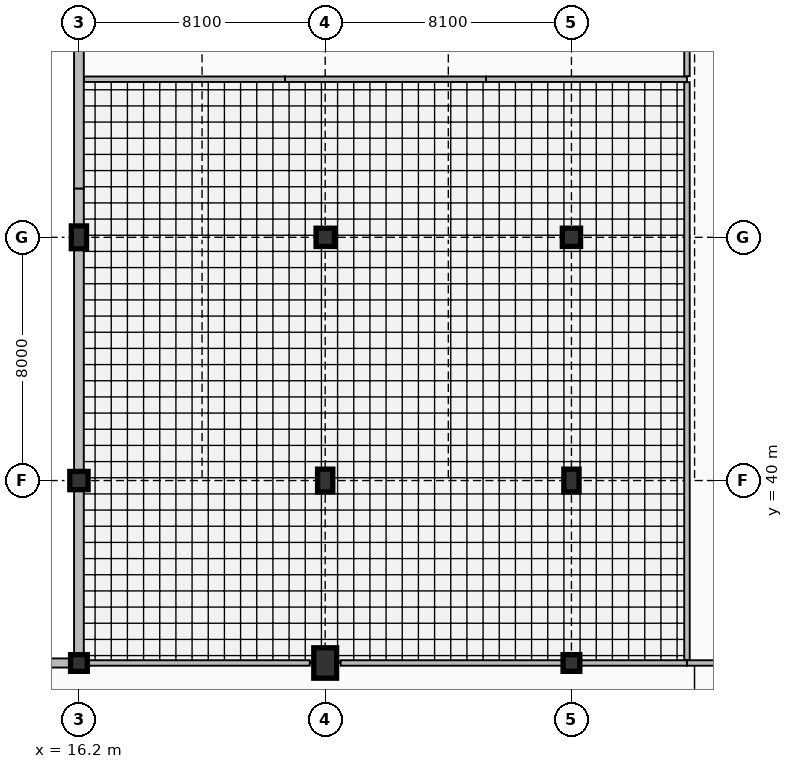
"""IFC4 building model, lengths in metres.
Left out: names, types, materials, properties, quantities, classifications, styles, units other than length and angle.
Written with IfcOpenShell. Run it as: python <this file> out.ifc"""

import sys

from ifc_helpers import new_model, si_unit, direction, frame, frame_2d, origin, origin_2d, place, context, subcontext, project, spatial, rectangle, extrude, element, fill, save


model = new_model("IFC4")
c1 = context("Model", 3, precision=1e-05, world=origin(), true_north=direction((0.0, 1.0)))
c2 = subcontext(c1, "Body", "Model", "MODEL_VIEW")
j1 = project(units=[si_unit("LENGTHUNIT", "METRE"), si_unit("PLANEANGLEUNIT", "RADIAN")], contexts=[c1])
p1 = place(None, origin())
s1 = spatial("IfcSite", under=j1, at=p1, CompositionType="ELEMENT")
p2 = place(p1, origin())
s2 = spatial("IfcBuilding", under=s1, at=p2, CompositionType="ELEMENT")
p3 = place(p2, frame((0.0, 0.0, 10.2)))
s3 = spatial("IfcBuildingStorey", under=s2, at=p3, CompositionType="ELEMENT", Elevation=10.2)
p4 = place(p3, frame((16.2, 34.0, 0.0), z_axis=(0.0, 0.0, 1.0), x_axis=(1.0, 0.0, 0.0)))
e1 = element("IfcColumn", 1, at=p4, inside=s3, PredefinedType="COLUMN", context=c2, shape_type="SweptSolid", body=[
    extrude(rectangle(XDim=0.55, YDim=0.55, at=origin_2d()), origin(), (0.0, 0.0, 1.0), 4.24),
])
p5 = place(p3, frame((16.2, 40.0, 0.0), z_axis=(0.0, 0.0, 1.0), x_axis=(1.0, 0.0, 0.0)))
e2 = element("IfcColumn", 2, at=p5, inside=s3, PredefinedType="COLUMN", context=c2, shape_type="SweptSolid", body=[
    extrude(rectangle(XDim=0.6, YDim=0.6, at=origin_2d()), origin(), (0.0, 0.0, 1.0), 4.5),
])
p6 = place(p3, frame((16.2, 48.0, 0.0), z_axis=(0.0, 0.0, 1.0), x_axis=(1.0, 0.0, 0.0)))
e3 = element("IfcColumn", 3, at=p6, inside=s3, PredefinedType="COLUMN", context=c2, shape_type="SweptSolid", body=[
    extrude(rectangle(XDim=0.5, YDim=0.75, at=origin_2d()), origin(), (0.0, 0.0, 1.0), 4.5),
])
p7 = place(p3, frame((24.3, 34.0, 0.0), z_axis=(0.0, 0.0, 1.0), x_axis=(1.0, 0.0, 0.0)))
e4 = element("IfcColumn", 4, at=p7, inside=s3, PredefinedType="COLUMN", context=c2, shape_type="SweptSolid", body=[
    extrude(rectangle(XDim=0.75, YDim=1.0, at=origin_2d()), origin(), (0.0, 0.0, 1.0), 4.5),
])
p8 = place(p3, frame((24.3, 40.0, 0.0), z_axis=(0.0, 0.0, 1.0), x_axis=(1.0, 0.0, 0.0)))
e5 = element("IfcColumn", 5, at=p8, inside=s3, PredefinedType="COLUMN", context=c2, shape_type="SweptSolid", body=[
    extrude(rectangle(XDim=0.5, YDim=0.75, at=origin_2d()), origin(), (0.0, 0.0, 1.0), 4.5),
])
p9 = place(p3, frame((24.3, 48.0, 0.0), z_axis=(0.0, 0.0, 1.0), x_axis=(1.0, 0.0, 0.0)))
e6 = element("IfcColumn", 6, at=p9, inside=s3, PredefinedType="COLUMN", context=c2, shape_type="SweptSolid", body=[
    extrude(rectangle(XDim=0.6, YDim=0.6, at=origin_2d()), origin(), (0.0, 0.0, 1.0), 4.5),
])
p10 = place(p3, frame((32.4, 34.0, 0.0), z_axis=(0.0, 0.0, 1.0), x_axis=(1.0, 0.0, 0.0)))
e7 = element("IfcColumn", 7, at=p10, inside=s3, PredefinedType="COLUMN", context=c2, shape_type="SweptSolid", body=[
    extrude(rectangle(XDim=0.55, YDim=0.55, at=origin_2d()), origin(), (0.0, 0.0, 1.0), 4.24),
])
p11 = place(p3, frame((32.4, 40.0, 0.0), z_axis=(0.0, 0.0, 1.0), x_axis=(1.0, 0.0, 0.0)))
e8 = element("IfcColumn", 8, at=p11, inside=s3, PredefinedType="COLUMN", context=c2, shape_type="SweptSolid", body=[
    extrude(rectangle(XDim=0.5, YDim=0.75, at=origin_2d()), origin(), (0.0, 0.0, 1.0), 4.5),
])
p12 = place(p3, frame((32.4, 48.0, 0.0), z_axis=(0.0, 0.0, 1.0), x_axis=(1.0, 0.0, 0.0)))
e9 = element("IfcColumn", 9, at=p12, inside=s3, PredefinedType="COLUMN", context=c2, shape_type="SweptSolid", body=[
    extrude(rectangle(XDim=0.6, YDim=0.6, at=origin_2d()), origin(), (0.0, 0.0, 1.0), 4.5),
])
p13 = place(p3, frame((16.2, 65.2, 0.0), z_axis=(0.0, 0.0, 1.0), x_axis=(0.0, -1.0, 0.0)))
e10 = element("IfcWall", 10, at=p13, inside=s3, PredefinedType="SOLIDWALL", context=c2, shape_type="SweptSolid", body=[
    extrude(rectangle(XDim=15.6, YDim=0.32, at=frame_2d((7.8, 0.0))), origin(), (0.0, 0.0, 1.0), 3.732),
])
p14 = place(p3, frame((16.2, 49.6, 0.0), z_axis=(0.0, 0.0, 1.0), x_axis=(0.0, -1.0, 0.0)))
e11 = element("IfcWall", 11, at=p14, inside=s3, PredefinedType="SOLIDWALL", context=c2, shape_type="SweptSolid", body=[
    extrude(rectangle(XDim=15.6, YDim=0.32, at=frame_2d((7.8, 0.0))), origin(), (0.0, 0.0, 1.0), 3.732),
])
p15 = place(p14, frame((4.5, 0.0, 0.85)))
e12 = element("IfcOpeningElement", 12, at=p15, cuts=e11, PredefinedType="OPENING", context=c2, shape_type="SweptSolid", body=[
    extrude(rectangle(XDim=1.8, YDim=2.1, at=frame_2d((0.9, 1.05))), frame((0.0, 0.17, 0.0), z_axis=(0.0, -1.0, 0.0), x_axis=(1.0, 0.0, 0.0)), (0.0, 0.0, 1.0), 0.34),
])
p16 = place(p3, frame((16.2, 34.0, 0.0), z_axis=(0.0, 0.0, 1.0), x_axis=(-1.0, 0.0, 0.0)))
e13 = element("IfcWall", 13, at=p16, inside=s3, PredefinedType="SOLIDWALL", context=c2, shape_type="SweptSolid", body=[
    extrude(rectangle(XDim=8.1, YDim=0.3, at=frame_2d((4.05, 0.0))), origin(), (0.0, 0.0, 1.0), 3.62),
])
p17 = place(p16, frame((3.15, 0.0, 0.85)))
e14 = element("IfcOpeningElement", 14, at=p17, cuts=e13, PredefinedType="OPENING", context=c2, shape_type="SweptSolid", body=[
    extrude(rectangle(XDim=1.8, YDim=2.4, at=frame_2d((0.9, 1.2))), frame((0.0, 0.16, 0.0), z_axis=(0.0, -1.0, 0.0), x_axis=(1.0, 0.0, 0.0)), (0.0, 0.0, 1.0), 0.32),
])
p18 = place(p3, frame((16.483, 34.0, 0.0), z_axis=(0.0, 0.0, 1.0), x_axis=(1.0, 0.0, 0.0)))
e15 = element("IfcWall", 15, at=p18, inside=s3, PredefinedType="PARTITIONING", context=c2, shape_type="SweptSolid", body=[
    extrude(rectangle(XDim=7.309, YDim=0.18, at=frame_2d((3.655, 0.0))), origin(), (0.0, 0.0, 1.0), 3.62),
])
p19 = place(p3, frame((24.808, 34.0, 0.0), z_axis=(0.0, 0.0, 1.0), x_axis=(1.0, 0.0, 0.0)))
e16 = element("IfcWall", 16, at=p19, inside=s3, PredefinedType="PARTITIONING", context=c2, shape_type="SweptSolid", body=[
    extrude(rectangle(XDim=7.309, YDim=0.18, at=frame_2d((3.654, 0.0))), origin(), (0.0, 0.0, 1.0), 3.544),
])
p20 = place(p3, frame((32.683, 34.0, 0.0), z_axis=(0.0, 0.0, 1.0), x_axis=(1.0, 0.0, 0.0)))
e17 = element("IfcWall", 17, at=p20, inside=s3, PredefinedType="PARTITIONING", context=c2, shape_type="SweptSolid", body=[
    extrude(rectangle(XDim=3.517, YDim=0.18, at=frame_2d((1.758, 0.0))), origin(), (0.0, 0.0, 1.0), 3.544),
])
p21 = place(p3, frame((16.368, 53.2, 0.0), z_axis=(0.0, 0.0, 1.0), x_axis=(1.0, 0.0, 0.0)))
e18 = element("IfcWall", 18, at=p21, inside=s3, PredefinedType="PARTITIONING", context=c2, shape_type="SweptSolid", body=[
    extrude(rectangle(XDim=6.611, YDim=0.18, at=frame_2d((3.305, 0.0))), origin(), (0.0, 0.0, 1.0), 4.24),
])
for number, where, z_axis, x_axis in (
    (19, (22.979, 53.2, 0.0), (0.0, 0.0, 1.0), (1.0, 0.0, 0.0)),
    (20, (29.589, 53.2, 0.0), (0.0, 0.0, 1.0), (1.0, 0.0, 0.0)),
):
    element("IfcWall", number, at=place(p3, frame(where, z_axis=z_axis, x_axis=x_axis)), inside=s3, PredefinedType="PARTITIONING", context=c2, shape_type="SweptSolid", body=[
        extrude(rectangle(XDim=6.611, YDim=0.18, at=frame_2d((3.305, 0.0))), origin(), (0.0, 0.0, 1.0), 4.24),
    ])
p22 = place(p3, frame((36.2, 34.0, 0.0), z_axis=(0.0, 0.0, 1.0), x_axis=(1.0, 0.0, 0.0)))
e21 = element("IfcWall", 21, at=p22, inside=s3, PredefinedType="PARTITIONING", context=c2, shape_type="SweptSolid", body=[
    extrude(rectangle(XDim=4.017, YDim=0.18, at=frame_2d((2.009, 0.0))), origin(), (0.0, 0.0, 1.0), 3.544),
])
p23 = place(p22, frame((1.408, 0.0, 0.0)))
e22 = element("IfcOpeningElement", 22, at=p23, cuts=e21, PredefinedType="OPENING", context=c2, shape_type="SweptSolid", body=[
    extrude(rectangle(XDim=1.2, YDim=2.2, at=frame_2d((0.6, 1.1))), frame((0.0, 0.1, 0.0), z_axis=(0.0, -1.0, 0.0), x_axis=(1.0, 0.0, 0.0)), (0.0, 0.0, 1.0), 0.2),
])
p24 = place(p3, frame((36.2, 34.098, 0.0), z_axis=(0.0, 0.0, 1.0), x_axis=(0.0, 1.0, 0.0)))
e23 = element("IfcWall", 23, at=p24, inside=s3, PredefinedType="PARTITIONING", context=c2, shape_type="SweptSolid", body=[
    extrude(rectangle(XDim=19.004, YDim=0.18, at=frame_2d((9.502, 0.0))), origin(), (0.0, 0.0, 1.0), 3.825),
])
p25 = place(p24, frame((8.952, 0.0, 0.0)))
e24 = element("IfcOpeningElement", 24, at=p25, cuts=e23, PredefinedType="OPENING", context=c2, shape_type="SweptSolid", body=[
    extrude(rectangle(XDim=1.1, YDim=2.2, at=frame_2d((0.55, 1.1))), frame((0.0, 0.1, 0.0), z_axis=(0.0, -1.0, 0.0), x_axis=(1.0, 0.0, 0.0)), (0.0, 0.0, 1.0), 0.2),
])
p26 = place(p3, frame((36.2, 53.298, 0.0), z_axis=(0.0, 0.0, 1.0), x_axis=(0.0, 1.0, 0.0)))
e25 = element("IfcWall", 25, at=p26, inside=s3, PredefinedType="PARTITIONING", context=c2, shape_type="SweptSolid", body=[
    extrude(rectangle(XDim=3.404, YDim=0.18, at=frame_2d((1.702, 0.0))), origin(), (0.0, 0.0, 1.0), 3.825),
])
p27 = place(p26, frame((1.152, 0.0, 0.0)))
e26 = element("IfcOpeningElement", 26, at=p27, cuts=e25, PredefinedType="OPENING", context=c2, shape_type="SweptSolid", body=[
    extrude(rectangle(XDim=1.1, YDim=2.2, at=frame_2d((0.55, 1.1))), frame((0.0, 0.1, 0.0), z_axis=(0.0, -1.0, 0.0), x_axis=(1.0, 0.0, 0.0)), (0.0, 0.0, 1.0), 0.2),
])
p28 = place(p15, origin())
e27 = element("IfcWindow", 27, at=p28, inside=s3, PartitioningType="DOUBLE_PANEL_VERTICAL", PredefinedType="WINDOW", context=c2, shape_type="SweptSolid", body=[
    extrude(rectangle(XDim=1.8, YDim=2.1, at=frame_2d((0.9, 1.05))), frame((0.0, 0.03, 0.0), z_axis=(0.0, -1.0, 0.0), x_axis=(1.0, 0.0, 0.0)), (0.0, 0.0, 1.0), 0.06),
])
fill(e12, e27)
p29 = place(p25, origin())
e28 = element("IfcDoor", 28, at=p29, inside=s3, OperationType="SINGLE_SWING_LEFT", PredefinedType="DOOR", context=c2, shape_type="SweptSolid", body=[
    extrude(rectangle(XDim=1.1, YDim=2.2, at=frame_2d((0.55, 1.1))), frame((0.0, 0.025, 0.0), z_axis=(0.0, -1.0, 0.0), x_axis=(1.0, 0.0, 0.0)), (0.0, 0.0, 1.0), 0.05),
])
fill(e24, e28)
save(model, sys.argv[1])
